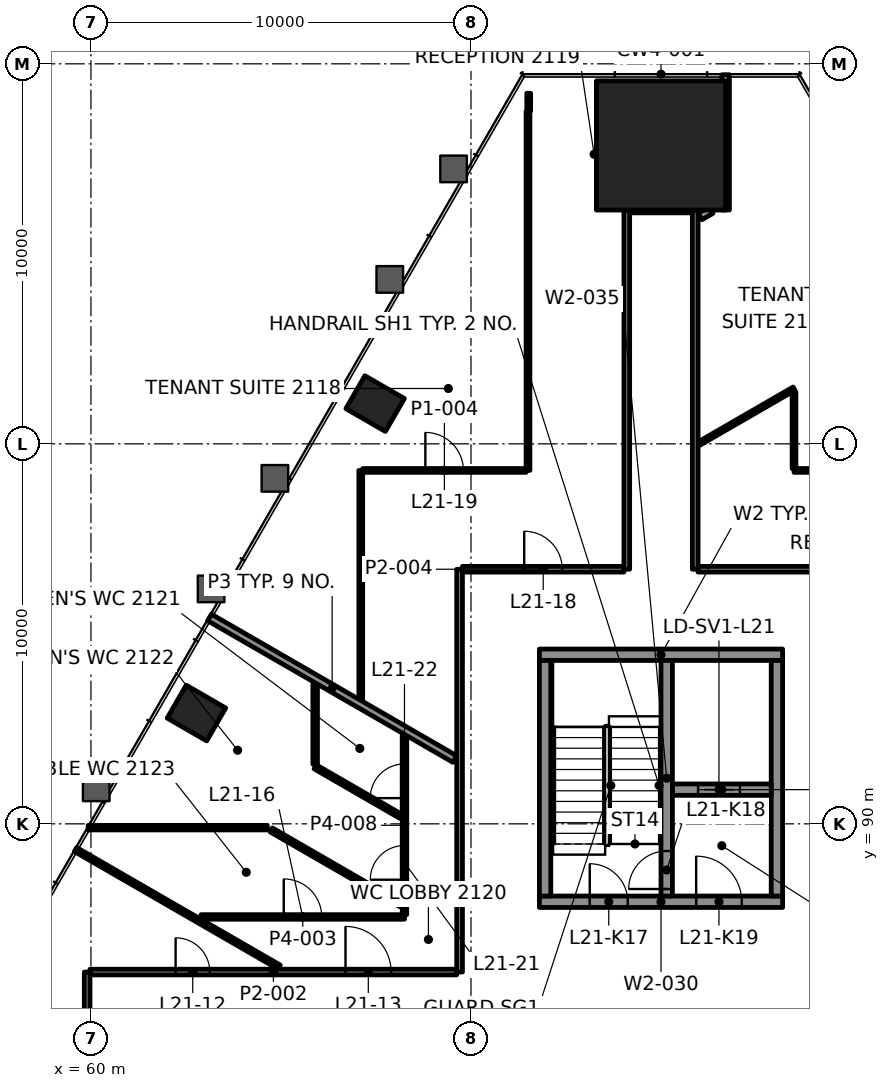
"""IFC4 building model, lengths in metres.
Left out: names, types, materials, properties, quantities, classifications, styles, units other than length and angle.
Written with IfcOpenShell. Run it as: python <this file> out.ifc"""

import sys

from ifc_helpers import new_model, si_unit, direction, frame, frame_2d, origin, origin_2d, place, context, subcontext, project, spatial, rectangle, extrude, element, fill, save


model = new_model("IFC4")
c1 = context("Model", 3, precision=1e-05, world=origin(), true_north=direction((0.0, 1.0)))
c2 = subcontext(c1, "Body", "Model", "MODEL_VIEW")
j1 = project(units=[si_unit("LENGTHUNIT", "METRE"), si_unit("PLANEANGLEUNIT", "RADIAN")], contexts=[c1])
p1 = place(None, origin())
s1 = spatial("IfcSite", under=j1, at=p1, CompositionType="ELEMENT")
p2 = place(p1, origin())
s2 = spatial("IfcBuilding", under=s1, at=p2, CompositionType="ELEMENT")
p3 = place(p2, frame((0.0, 0.0, 94.6)))
s3 = spatial("IfcBuildingStorey", under=s2, at=p3, CompositionType="ELEMENT", Elevation=94.6)
p4 = place(p3, frame((75.0, 107.853, 0.0), z_axis=(0.0, 0.0, 1.0), x_axis=(-1.0, 0.0, 0.0)))
e1 = element("IfcColumn", 1, at=p4, inside=s3, PredefinedType="COLUMN", context=c2, shape_type="SweptSolid", body=[
    extrude(rectangle(XDim=3.4, YDim=3.4, at=origin_2d()), origin(), (0.0, 0.0, 1.0), 4.2),
])
for number, where, z_axis, x_axis in (
    (2, (67.478, 101.059, -0.0), (0.0, 0.0, 1.0), (-0.5, -0.866, 0.0)),
    (3, (62.776, 92.916, -0.0), (0.0, 0.0, 1.0), (-0.5, -0.866, 0.0)),
):
    element("IfcColumn", number, at=place(p3, frame(where, z_axis=z_axis, x_axis=x_axis)), inside=s3, PredefinedType="COLUMN", context=c2, shape_type="SweptSolid", body=[
        extrude(rectangle(XDim=1.0, YDim=1.2, at=origin_2d()), origin(), (0.0, 0.0, 1.0), 4.2),
    ])
p5 = place(p3, frame((71.8, 87.95, 0.0), z_axis=(0.0, 0.0, 1.0), x_axis=(1.0, 0.0, 0.0)))
e4 = element("IfcWall", 4, at=p5, inside=s3, PredefinedType="SHEAR", context=c2, shape_type="SweptSolid", body=[
    extrude(rectangle(XDim=6.4, YDim=0.3, at=frame_2d((3.2, 0.0))), origin(), (0.0, 0.0, 1.0), 4.0),
])
p6 = place(p5, frame((1.325, 0.0, 0.0)))
e5 = element("IfcOpeningElement", 5, at=p6, cuts=e4, PredefinedType="OPENING", context=c2, shape_type="SweptSolid", body=[
    extrude(rectangle(XDim=1.0, YDim=2.1, at=frame_2d((0.5, 1.05))), frame((0.0, 0.16, 0.0), z_axis=(0.0, -1.0, 0.0), x_axis=(1.0, 0.0, 0.0)), (0.0, 0.0, 1.0), 0.32),
])
p7 = place(p5, frame((4.125, 0.0, 0.0)))
e6 = element("IfcOpeningElement", 6, at=p7, cuts=e4, PredefinedType="OPENING", context=c2, shape_type="SweptSolid", body=[
    extrude(rectangle(XDim=1.2, YDim=2.1, at=frame_2d((0.6, 1.05))), frame((0.0, 0.16, 0.0), z_axis=(0.0, -1.0, 0.0), x_axis=(1.0, 0.0, 0.0)), (0.0, 0.0, 1.0), 0.32),
])
p8 = place(p3, frame((71.8, 94.45, 0.0), z_axis=(0.0, 0.0, 1.0), x_axis=(1.0, 0.0, 0.0)))
e7 = element("IfcWall", 7, at=p8, inside=s3, PredefinedType="SHEAR", context=c2, shape_type="SweptSolid", body=[
    extrude(rectangle(XDim=6.4, YDim=0.3, at=frame_2d((3.2, 0.0))), origin(), (0.0, 0.0, 1.0), 4.0),
])
for number, where, z_axis, x_axis in (
    (8, (71.95, 88.1, 0.0), (0.0, 0.0, 1.0), (0.0, 1.0, 0.0)),
    (9, (78.05, 88.1, 0.0), (0.0, 0.0, 1.0), (0.0, 1.0, 0.0)),
):
    element("IfcWall", number, at=place(p3, frame(where, z_axis=z_axis, x_axis=x_axis)), inside=s3, PredefinedType="SHEAR", context=c2, shape_type="SweptSolid", body=[
        extrude(rectangle(XDim=6.2, YDim=0.3, at=frame_2d((3.1, 0.0))), origin(), (0.0, 0.0, 1.0), 4.0),
    ])
p9 = place(p3, frame((75.3, 90.9, 0.0), z_axis=(0.0, 0.0, 1.0), x_axis=(1.0, 0.0, 0.0)))
e10 = element("IfcWall", 10, at=p9, inside=s3, PredefinedType="SHEAR", context=c2, shape_type="SweptSolid", body=[
    extrude(rectangle(XDim=2.6, YDim=0.3, at=frame_2d((1.3, 0.0))), origin(), (0.0, 0.0, 1.0), 4.0),
])
p10 = place(p9, frame((0.675, 0.0, 0.0)))
e11 = element("IfcOpeningElement", 11, at=p10, cuts=e10, PredefinedType="OPENING", context=c2, shape_type="SweptSolid", body=[
    extrude(rectangle(XDim=1.1, YDim=2.1, at=frame_2d((0.55, 1.05))), frame((0.0, 0.16, 0.0), z_axis=(0.0, -1.0, 0.0), x_axis=(1.0, 0.0, 0.0)), (0.0, 0.0, 1.0), 0.32),
])
p11 = place(p3, frame((75.15, 88.1, 0.0), z_axis=(0.0, 0.0, 1.0), x_axis=(0.0, 1.0, 0.0)))
e12 = element("IfcWall", 12, at=p11, inside=s3, PredefinedType="SHEAR", context=c2, shape_type="SweptSolid", body=[
    extrude(rectangle(XDim=6.2, YDim=0.3, at=frame_2d((3.1, 0.0))), origin(), (0.0, 0.0, 1.0), 4.0),
])
p12 = place(p11, frame((0.185, 0.0, 0.0)))
e13 = element("IfcOpeningElement", 13, at=p12, cuts=e12, PredefinedType="OPENING", context=c2, shape_type="SweptSolid", body=[
    extrude(rectangle(XDim=1.0, YDim=2.1, at=frame_2d((0.5, 1.05))), frame((0.0, 0.16, 0.0), z_axis=(0.0, -1.0, 0.0), x_axis=(1.0, 0.0, 0.0)), (0.0, 0.0, 1.0), 0.32),
])
p13 = place(p3, frame((59.976, 86.1, 0.0), z_axis=(0.0, 0.0, 1.0), x_axis=(1.0, 0.0, 0.0)))
e14 = element("IfcWall", 14, at=p13, inside=s3, PredefinedType="PARTITIONING", context=c2, shape_type="SweptSolid", body=[
    extrude(rectangle(XDim=9.649, YDim=0.15, at=frame_2d((4.825, 0.0))), origin(), (0.0, 0.0, 1.0), 3.4),
])
p14 = place(p13, frame((2.252, 0.0, 0.0)))
e15 = element("IfcOpeningElement", 15, at=p14, cuts=e14, PredefinedType="OPENING", context=c2, shape_type="SweptSolid", body=[
    extrude(rectangle(XDim=0.9, YDim=2.1, at=frame_2d((0.45, 1.05))), frame((0.0, 0.085, 0.0), z_axis=(0.0, -1.0, 0.0), x_axis=(1.0, 0.0, 0.0)), (0.0, 0.0, 1.0), 0.17),
])
p15 = place(p13, frame((6.723, 0.0, 0.0)))
e16 = element("IfcOpeningElement", 16, at=p15, cuts=e14, PredefinedType="OPENING", context=c2, shape_type="SweptSolid", body=[
    extrude(rectangle(XDim=1.2, YDim=2.1, at=frame_2d((0.6, 1.05))), frame((0.0, 0.085, 0.0), z_axis=(0.0, -1.0, 0.0), x_axis=(1.0, 0.0, 0.0)), (0.0, 0.0, 1.0), 0.17),
])
p16 = place(p3, frame((62.896, 87.55, 0.0), z_axis=(0.0, 0.0, 1.0), x_axis=(1.0, 0.0, 0.0)))
e17 = element("IfcWall", 17, at=p16, inside=s3, PredefinedType="PARTITIONING", context=c2, shape_type="SweptSolid", body=[
    extrude(rectangle(XDim=5.354, YDim=0.12, at=frame_2d((2.677, 0.0))), origin(), (0.0, 0.0, 1.0), 3.4),
])
p17 = place(p16, frame((2.177, 0.0, 0.0)))
e18 = element("IfcOpeningElement", 18, at=p17, cuts=e17, PredefinedType="OPENING", context=c2, shape_type="SweptSolid", body=[
    extrude(rectangle(XDim=1.0, YDim=2.1, at=frame_2d((0.5, 1.05))), frame((0.0, 0.07, 0.0), z_axis=(0.0, -1.0, 0.0), x_axis=(1.0, 0.0, 0.0)), (0.0, 0.0, 1.0), 0.14),
])
p18 = place(p3, frame((59.927, 89.9, 0.0), z_axis=(0.0, 0.0, 1.0), x_axis=(1.0, 0.0, 0.0)))
e19 = element("IfcWall", 19, at=p18, inside=s3, PredefinedType="PARTITIONING", context=c2, shape_type="SweptSolid", body=[
    extrude(rectangle(XDim=4.714, YDim=0.12, at=frame_2d((2.357, 0.0))), origin(), (0.0, 0.0, 1.0), 3.165),
])
p19 = place(p3, frame((69.775, 96.7, 0.0), z_axis=(0.0, 0.0, 1.0), x_axis=(1.0, 0.0, 0.0)))
e20 = element("IfcWall", 20, at=p19, inside=s3, PredefinedType="PARTITIONING", context=c2, shape_type="SweptSolid", body=[
    extrude(rectangle(XDim=4.25, YDim=0.15, at=frame_2d((2.125, 0.0))), origin(), (0.0, 0.0, 1.0), 3.4),
])
p20 = place(p19, frame((1.625, 0.0, 0.0)))
e21 = element("IfcOpeningElement", 21, at=p20, cuts=e20, PredefinedType="OPENING", context=c2, shape_type="SweptSolid", body=[
    extrude(rectangle(XDim=1.0, YDim=2.1, at=frame_2d((0.5, 1.05))), frame((0.0, 0.085, 0.0), z_axis=(0.0, -1.0, 0.0), x_axis=(1.0, 0.0, 0.0)), (0.0, 0.0, 1.0), 0.17),
])
p21 = place(p3, frame((75.975, 96.7, 0.0), z_axis=(0.0, 0.0, 1.0), x_axis=(1.0, 0.0, 0.0)))
e22 = element("IfcWall", 22, at=p21, inside=s3, PredefinedType="PARTITIONING", context=c2, shape_type="SweptSolid", body=[
    extrude(rectangle(XDim=4.25, YDim=0.15, at=frame_2d((2.125, 0.0))), origin(), (0.0, 0.0, 1.0), 3.4),
])
p22 = place(p3, frame((67.15, 99.3, 0.0), z_axis=(0.0, 0.0, 1.0), x_axis=(1.0, 0.0, 0.0)))
e23 = element("IfcWall", 23, at=p22, inside=s3, PredefinedType="PARTITIONING", context=c2, shape_type="SweptSolid", body=[
    extrude(rectangle(XDim=4.3, YDim=0.1, at=frame_2d((2.15, 0.0))), origin(), (0.0, 0.0, 1.0), 3.4),
])
p23 = place(p22, frame((1.65, 0.0, 0.0)))
e24 = element("IfcOpeningElement", 24, at=p23, cuts=e23, PredefinedType="OPENING", context=c2, shape_type="SweptSolid", body=[
    extrude(rectangle(XDim=1.0, YDim=2.1, at=frame_2d((0.5, 1.05))), frame((0.0, 0.06, 0.0), z_axis=(0.0, -1.0, 0.0), x_axis=(1.0, 0.0, 0.0)), (0.0, 0.0, 1.0), 0.12),
])
p24 = place(p3, frame((78.5, 99.3, 0.0), z_axis=(0.0, 0.0, 1.0), x_axis=(1.0, 0.0, 0.0)))
e25 = element("IfcWall", 25, at=p24, inside=s3, PredefinedType="PARTITIONING", context=c2, shape_type="SweptSolid", body=[
    extrude(rectangle(XDim=4.35, YDim=0.1, at=frame_2d((2.175, 0.0))), origin(), (0.0, 0.0, 1.0), 3.4),
])
p25 = place(p3, frame((74.176, 106.153, 0.0), z_axis=(0.0, 0.0, 1.0), x_axis=(1.0, 0.0, 0.0)))
e26 = element("IfcWall", 26, at=p25, inside=s3, PredefinedType="PARTITIONING", context=c2, shape_type="SweptSolid", body=[
    extrude(rectangle(XDim=1.649, YDim=0.15, at=frame_2d((0.824, 0.0))), origin(), (0.0, 0.0, 1.0), 3.397),
])
p26 = place(p3, frame((76.001, 100.008, 0.0), z_axis=(0.0, 0.0, 1.0), x_axis=(0.866016514357, 0.500015396624, 0.0)))
e27 = element("IfcWall", 27, at=p26, inside=s3, PredefinedType="PARTITIONING", context=c2, shape_type="SweptSolid", body=[
    extrude(rectangle(XDim=2.886, YDim=0.1, at=frame_2d((1.443, 0.0))), origin(), (0.0, 0.0, 1.0), 3.4),
])
p27 = place(p3, frame((76.028, 105.984, 0.0), z_axis=(0.0, 0.0, 1.0), x_axis=(0.866137275136, 0.499806183056, 0.0)))
e28 = element("IfcWall", 28, at=p27, inside=s3, PredefinedType="PARTITIONING", context=c2, shape_type="SweptSolid", body=[
    extrude(rectangle(XDim=0.337, YDim=0.2, at=frame_2d((0.168, 0.0))), origin(), (0.0, 0.0, 1.0), 3.4),
])
p28 = place(p3, frame((78.5, 99.35, 0.0), z_axis=(0.0, 0.0, 1.0), x_axis=(0.0, 1.0, 0.0)))
e29 = element("IfcWall", 29, at=p28, inside=s3, PredefinedType="PARTITIONING", context=c2, shape_type="SweptSolid", body=[
    extrude(rectangle(XDim=2.014, YDim=0.1, at=frame_2d((1.007, 0.0))), origin(), (0.0, 0.0, 1.0), 3.4),
])
p29 = place(p3, frame((76.7, 106.153, 0.0), z_axis=(0.0, 0.0, 1.0), x_axis=(0.0, 1.0, 0.0)))
e30 = element("IfcWall", 30, at=p29, inside=s3, PredefinedType="PARTITIONING", context=c2, shape_type="SweptSolid", body=[
    extrude(rectangle(XDim=3.559, YDim=0.2, at=frame_2d((1.78, 0.0))), origin(), (0.0, 0.0, 1.0), 3.4),
])
for number, where, z_axis, x_axis in (
    (31, (75.9, 96.7, 0.0), (0.0, 0.0, 1.0), (0.0, 1.0, 0.0)),
    (32, (74.1, 96.7, 0.0), (0.0, 0.0, 1.0), (0.0, 1.0, 0.0)),
):
    element("IfcWall", number, at=place(p3, frame(where, z_axis=z_axis, x_axis=x_axis)), inside=s3, PredefinedType="PARTITIONING", context=c2, shape_type="SweptSolid", body=[
        extrude(rectangle(XDim=9.452, YDim=0.15, at=frame_2d((4.726, 0.0))), origin(), (0.0, 0.0, 1.0), 3.4),
    ])
p30 = place(p3, frame((71.519, 108.753, 0.0), z_axis=(0.0, 0.0, 1.0), x_axis=(0.0, 1.0, 0.0)))
e33 = element("IfcWall", 33, at=p30, inside=s3, PredefinedType="PARTITIONING", context=c2, shape_type="SweptSolid", body=[
    extrude(rectangle(XDim=0.473, YDim=0.1, at=frame_2d((0.236, 0.0))), origin(), (0.0, 0.0, 1.0), 3.4),
])
p31 = place(p3, frame((71.5, 99.301, 0.0), z_axis=(0.0, 0.0, 1.0), x_axis=(0.0, 1.0, 0.0)))
e34 = element("IfcWall", 34, at=p31, inside=s3, PredefinedType="PARTITIONING", context=c2, shape_type="SweptSolid", body=[
    extrude(rectangle(XDim=9.452, YDim=0.1, at=frame_2d((4.726, 0.0))), origin(), (0.0, 0.0, 1.0), 3.4),
])
p32 = place(p3, frame((69.7, 86.1, 0.0), z_axis=(0.0, 0.0, 1.0), x_axis=(0.0, 1.0, 0.0)))
e35 = element("IfcWall", 35, at=p32, inside=s3, PredefinedType="PARTITIONING", context=c2, shape_type="SweptSolid", body=[
    extrude(rectangle(XDim=10.599, YDim=0.15, at=frame_2d((5.3, 0.0))), origin(), (0.0, 0.0, 1.0), 3.322),
])
p33 = place(p3, frame((68.25, 87.61, 0.0), z_axis=(0.0, 0.0, 1.0), x_axis=(0.0, 1.0, 0.0)))
e36 = element("IfcWall", 36, at=p33, inside=s3, PredefinedType="PARTITIONING", context=c2, shape_type="SweptSolid", body=[
    extrude(rectangle(XDim=4.704, YDim=0.12, at=frame_2d((2.352, 0.0))), origin(), (0.0, 0.0, 1.0), 3.322),
])
p34 = place(p33, frame((0.92, 0.0, 0.0)))
e37 = element("IfcOpeningElement", 37, at=p34, cuts=e36, PredefinedType="OPENING", context=c2, shape_type="SweptSolid", body=[
    extrude(rectangle(XDim=0.9, YDim=2.1, at=frame_2d((0.45, 1.05))), frame((0.0, 0.07, 0.0), z_axis=(0.0, -1.0, 0.0), x_axis=(1.0, 0.0, 0.0)), (0.0, 0.0, 1.0), 0.14),
])
p35 = place(p33, frame((3.067, 0.0, 0.0)))
e38 = element("IfcOpeningElement", 38, at=p35, cuts=e36, PredefinedType="OPENING", context=c2, shape_type="SweptSolid", body=[
    extrude(rectangle(XDim=0.9, YDim=2.1, at=frame_2d((0.45, 1.05))), frame((0.0, 0.07, 0.0), z_axis=(0.0, -1.0, 0.0), x_axis=(1.0, 0.0, 0.0)), (0.0, 0.0, 1.0), 0.14),
])
p36 = place(p3, frame((67.1, 93.279, 0.0), z_axis=(0.0, 0.0, 1.0), x_axis=(0.0, 1.0, 0.0)))
e39 = element("IfcWall", 39, at=p36, inside=s3, PredefinedType="PARTITIONING", context=c2, shape_type="SweptSolid", body=[
    extrude(rectangle(XDim=6.021, YDim=0.1, at=frame_2d((3.01, 0.0))), origin(), (0.0, 0.0, 1.0), 3.4),
])
p37 = place(p3, frame((65.9, 91.569, 0.0), z_axis=(0.0, 0.0, 1.0), x_axis=(0.0, 1.0, 0.0)))
e40 = element("IfcWall", 40, at=p37, inside=s3, PredefinedType="PARTITIONING", context=c2, shape_type="SweptSolid", body=[
    extrude(rectangle(XDim=2.101, YDim=0.12, at=frame_2d((1.051, 0.0))), origin(), (0.0, 0.0, 1.0), 3.4),
])
p38 = place(p3, frame((59.9, 67.321, 0.0), z_axis=(0.0, 0.0, 1.0), x_axis=(0.0, 1.0, 0.0)))
e41 = element("IfcWall", 41, at=p38, inside=s3, PredefinedType="PARTITIONING", context=c2, shape_type="SweptSolid", body=[
    extrude(rectangle(XDim=18.778, YDim=0.15, at=frame_2d((9.389, 0.0))), origin(), (0.0, 0.0, 1.0), 3.4),
])
p39 = place(p3, frame((69.573, 91.706, 0.0), z_axis=(0.0, 0.0, 1.0), x_axis=(-0.866024622953, 0.500001352437, 0.0)))
e42 = element("IfcWall", 42, at=p39, inside=s3, PredefinedType="PARTITIONING", context=c2, shape_type="SweptSolid", body=[
    extrude(rectangle(XDim=7.451, YDim=0.2, at=frame_2d((3.726, 0.0))), origin(), (0.0, 0.0, 1.0), 3.165),
])
p40 = place(p3, frame((68.155, 90.198, 0.0), z_axis=(0.0, 0.0, 1.0), x_axis=(-0.866024771944, 0.500001094379, 0.0)))
e43 = element("IfcWall", 43, at=p40, inside=s3, PredefinedType="PARTITIONING", context=c2, shape_type="SweptSolid", body=[
    extrude(rectangle(XDim=2.604, YDim=0.12, at=frame_2d((1.302, 0.0))), origin(), (0.0, 0.0, 1.0), 3.4),
])
p41 = place(p3, frame((68.155, 87.871, 0.0), z_axis=(0.0, 0.0, 1.0), x_axis=(-0.866041060244, 0.499972881236, 0.0)))
e44 = element("IfcWall", 44, at=p41, inside=s3, PredefinedType="PARTITIONING", context=c2, shape_type="SweptSolid", body=[
    extrude(rectangle(XDim=3.938, YDim=0.12, at=frame_2d((1.969, 0.0))), origin(), (0.0, 0.0, 1.0), 3.4),
])
p42 = place(p3, frame((64.953, 86.23, 0.0), z_axis=(0.0, 0.0, 1.0), x_axis=(-0.866029863972, 0.499992274648, 0.0)))
e45 = element("IfcWall", 45, at=p42, inside=s3, PredefinedType="PARTITIONING", context=c2, shape_type="SweptSolid", body=[
    extrude(rectangle(XDim=6.188, YDim=0.12, at=frame_2d((3.094, 0.0))), origin(), (0.0, 0.0, 1.0), 3.165),
])
p43 = place(p14, origin())
e46 = element("IfcDoor", 46, at=p43, inside=s3, OperationType="SINGLE_SWING_LEFT", PredefinedType="DOOR", context=c2, shape_type="SweptSolid", body=[
    extrude(rectangle(XDim=0.9, YDim=2.1, at=frame_2d((0.45, 1.05))), frame((0.0, 0.025, 0.0), z_axis=(0.0, -1.0, 0.0), x_axis=(1.0, 0.0, 0.0)), (0.0, 0.0, 1.0), 0.05),
])
fill(e15, e46)
p44 = place(p15, origin())
e47 = element("IfcDoor", 47, at=p44, inside=s3, OperationType="DOUBLE_DOOR_SINGLE_SWING", PredefinedType="DOOR", context=c2, shape_type="SweptSolid", body=[
    extrude(rectangle(XDim=1.2, YDim=2.1, at=frame_2d((0.6, 1.05))), frame((0.0, 0.025, 0.0), z_axis=(0.0, -1.0, 0.0), x_axis=(1.0, 0.0, 0.0)), (0.0, 0.0, 1.0), 0.05),
])
fill(e16, e47)
p45 = place(p17, origin())
e48 = element("IfcDoor", 48, at=p45, inside=s3, OperationType="SINGLE_SWING_RIGHT", PredefinedType="DOOR", context=c2, shape_type="SweptSolid", body=[
    extrude(rectangle(XDim=1.0, YDim=2.1, at=frame_2d((0.5, 1.05))), frame((0.0, 0.025, 0.0), z_axis=(0.0, -1.0, 0.0), x_axis=(1.0, 0.0, 0.0)), (0.0, 0.0, 1.0), 0.05),
])
fill(e18, e48)
p46 = place(p20, origin())
e49 = element("IfcDoor", 49, at=p46, inside=s3, OperationType="SINGLE_SWING_RIGHT", PredefinedType="DOOR", context=c2, shape_type="SweptSolid", body=[
    extrude(rectangle(XDim=1.0, YDim=2.1, at=frame_2d((0.5, 1.05))), frame((0.0, 0.025, 0.0), z_axis=(0.0, -1.0, 0.0), x_axis=(1.0, 0.0, 0.0)), (0.0, 0.0, 1.0), 0.05),
])
fill(e21, e49)
p47 = place(p23, origin())
e50 = element("IfcDoor", 50, at=p47, inside=s3, OperationType="SINGLE_SWING_LEFT", PredefinedType="DOOR", context=c2, shape_type="SweptSolid", body=[
    extrude(rectangle(XDim=1.0, YDim=2.1, at=frame_2d((0.5, 1.05))), frame((0.0, 0.025, 0.0), z_axis=(0.0, -1.0, 0.0), x_axis=(1.0, 0.0, 0.0)), (0.0, 0.0, 1.0), 0.05),
])
fill(e24, e50)
p48 = place(p34, origin())
e51 = element("IfcDoor", 51, at=p48, inside=s3, OperationType="SINGLE_SWING_LEFT", PredefinedType="DOOR", context=c2, shape_type="SweptSolid", body=[
    extrude(rectangle(XDim=0.9, YDim=2.1, at=frame_2d((0.45, 1.05))), frame((0.0, 0.025, 0.0), z_axis=(0.0, -1.0, 0.0), x_axis=(1.0, 0.0, 0.0)), (0.0, 0.0, 1.0), 0.05),
])
fill(e37, e51)
p49 = place(p35, origin())
e52 = element("IfcDoor", 52, at=p49, inside=s3, OperationType="SINGLE_SWING_RIGHT", PredefinedType="DOOR", context=c2, shape_type="SweptSolid", body=[
    extrude(rectangle(XDim=0.9, YDim=2.1, at=frame_2d((0.45, 1.05))), frame((0.0, 0.025, 0.0), z_axis=(0.0, -1.0, 0.0), x_axis=(1.0, 0.0, 0.0)), (0.0, 0.0, 1.0), 0.05),
])
fill(e38, e52)
p50 = place(p10, origin())
e53 = element("IfcDoor", 53, at=p50, inside=s3, OperationType="DOUBLE_DOOR_SLIDING", PredefinedType="DOOR", context=c2, shape_type="SweptSolid", body=[
    extrude(rectangle(XDim=1.1, YDim=2.1, at=frame_2d((0.55, 1.05))), frame((0.0, 0.025, 0.0), z_axis=(0.0, -1.0, 0.0), x_axis=(1.0, 0.0, 0.0)), (0.0, 0.0, 1.0), 0.05),
])
fill(e11, e53)
p51 = place(p6, origin())
e54 = element("IfcDoor", 54, at=p51, inside=s3, OperationType="SINGLE_SWING_RIGHT", PredefinedType="DOOR", context=c2, shape_type="SweptSolid", body=[
    extrude(rectangle(XDim=1.0, YDim=2.1, at=frame_2d((0.5, 1.05))), frame((0.0, 0.025, 0.0), z_axis=(0.0, -1.0, 0.0), x_axis=(1.0, 0.0, 0.0)), (0.0, 0.0, 1.0), 0.05),
])
fill(e5, e54)
p52 = place(p12, origin())
e55 = element("IfcDoor", 55, at=p52, inside=s3, OperationType="SINGLE_SWING_LEFT", PredefinedType="DOOR", context=c2, shape_type="SweptSolid", body=[
    extrude(rectangle(XDim=1.0, YDim=2.1, at=frame_2d((0.5, 1.05))), frame((0.0, 0.025, 0.0), z_axis=(0.0, -1.0, 0.0), x_axis=(1.0, 0.0, 0.0)), (0.0, 0.0, 1.0), 0.05),
])
fill(e13, e55)
p53 = place(p7, origin())
e56 = element("IfcDoor", 56, at=p53, inside=s3, OperationType="SINGLE_SWING_RIGHT", PredefinedType="DOOR", context=c2, shape_type="SweptSolid", body=[
    extrude(rectangle(XDim=1.2, YDim=2.1, at=frame_2d((0.6, 1.05))), frame((0.0, 0.025, 0.0), z_axis=(0.0, -1.0, 0.0), x_axis=(1.0, 0.0, 0.0)), (0.0, 0.0, 1.0), 0.05),
])
fill(e6, e56)
save(model, sys.argv[1])
